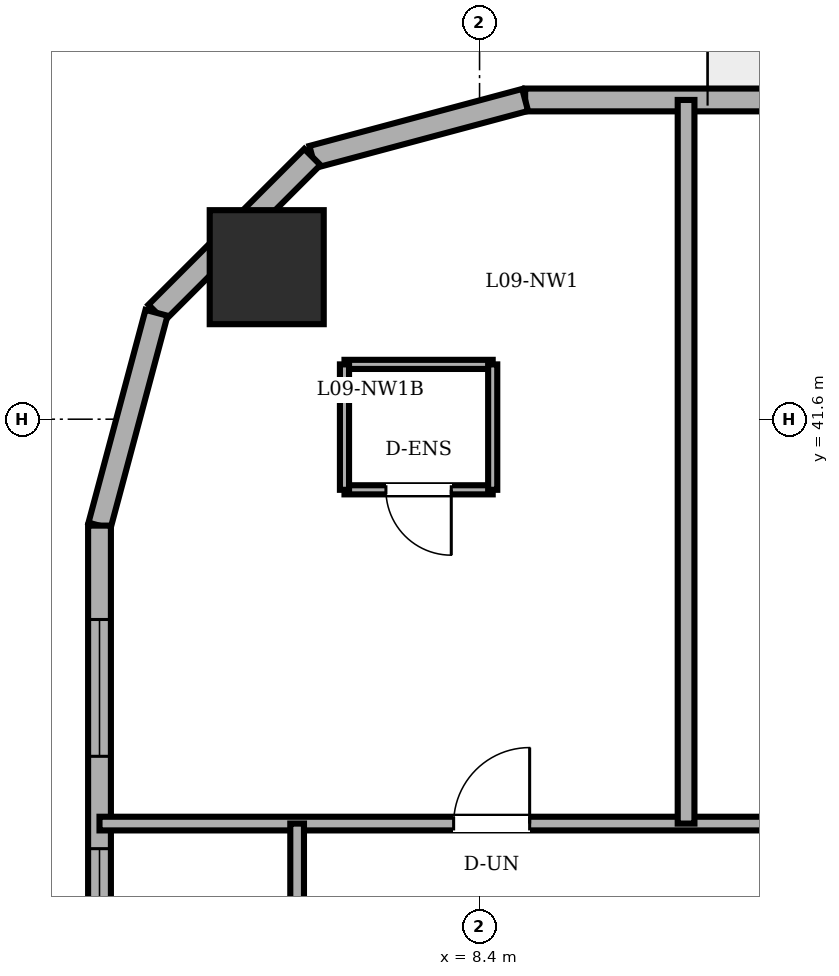
"""IFC4 building model, lengths in metres.
Left out: names, types, materials, properties, quantities, classifications, styles, units other than length and angle.
Written with IfcOpenShell. Run it as: python <this file> out.ifc"""

import sys

from ifc_helpers import new_model, si_unit, direction, frame, frame_2d, origin, origin_2d, place, context, subcontext, project, spatial, rectangle, circle, extrude, element, fill, save


model = new_model("IFC4")
c1 = context("Model", 3, precision=1e-05, world=origin(), true_north=direction((0.0, 1.0)))
c2 = subcontext(c1, "Body", "Model", "MODEL_VIEW")
j1 = project(units=[si_unit("LENGTHUNIT", "METRE"), si_unit("PLANEANGLEUNIT", "RADIAN")], contexts=[c1])
p1 = place(None, origin())
s1 = spatial("IfcSite", under=j1, at=p1, CompositionType="ELEMENT")
p2 = place(p1, origin())
s2 = spatial("IfcBuilding", under=s1, at=p2, CompositionType="ELEMENT")
p3 = place(p2, frame((0.0, 0.0, 36.0)))
s3 = spatial("IfcBuildingStorey", under=s2, at=p3, CompositionType="ELEMENT", Elevation=36.0)
p4 = place(p3, frame((5.6, 43.6, 0.0), z_axis=(0.0, 0.0, 1.0), x_axis=(1.0, 0.0, 0.0)))
e1 = element("IfcColumn", 1, at=p4, inside=s3, PredefinedType="COLUMN", context=c2, shape_type="SweptSolid", body=[
    extrude(circle(Radius=0.75, at=origin_2d()), origin(), (0.0, 0.0, 1.0), 3.6),
])
p5 = place(p3, frame((39.079, 45.8, 0.0), z_axis=(0.0, 0.0, 1.0), x_axis=(-1.0, 0.0, 0.0)))
e2 = element("IfcWall", 2, at=p5, inside=s3, PredefinedType="SOLIDWALL", context=c2, shape_type="SweptSolid", body=[
    extrude(rectangle(XDim=30.079, YDim=0.3, at=frame_2d((15.04, 0.0))), origin(), (0.0, 0.0, 1.0), 3.4),
])
p6 = place(p5, frame((16.504, 0.0, 0.0)))
e3 = element("IfcOpeningElement", 3, at=p6, cuts=e2, PredefinedType="OPENING", context=c2, shape_type="SweptSolid", body=[
    extrude(rectangle(XDim=0.95, YDim=2.2, at=frame_2d((0.475, 1.1))), frame((0.0, 0.16, 0.0), z_axis=(0.0, -1.0, 0.0), x_axis=(1.0, 0.0, 0.0)), (0.0, 0.0, 1.0), 0.32),
])
p7 = place(p5, frame((2.226, 0.0, 0.85)))
e4 = element("IfcOpeningElement", 4, at=p7, cuts=e2, PredefinedType="OPENING", context=c2, shape_type="SweptSolid", body=[
    extrude(rectangle(XDim=1.8, YDim=1.55, at=frame_2d((0.9, 0.775))), frame((0.0, 0.16, 0.0), z_axis=(0.0, -1.0, 0.0), x_axis=(1.0, 0.0, 0.0)), (0.0, 0.0, 1.0), 0.32),
])
p8 = place(p5, frame((5.003, 0.0, 0.85)))
e5 = element("IfcOpeningElement", 5, at=p8, cuts=e2, PredefinedType="OPENING", context=c2, shape_type="SweptSolid", body=[
    extrude(rectangle(XDim=1.8, YDim=1.55, at=frame_2d((0.9, 0.775))), frame((0.0, 0.16, 0.0), z_axis=(0.0, -1.0, 0.0), x_axis=(1.0, 0.0, 0.0)), (0.0, 0.0, 1.0), 0.32),
])
p9 = place(p5, frame((10.179, 0.0, 0.85)))
e6 = element("IfcOpeningElement", 6, at=p9, cuts=e2, PredefinedType="OPENING", context=c2, shape_type="SweptSolid", body=[
    extrude(rectangle(XDim=1.8, YDim=1.55, at=frame_2d((0.9, 0.775))), frame((0.0, 0.16, 0.0), z_axis=(0.0, -1.0, 0.0), x_axis=(1.0, 0.0, 0.0)), (0.0, 0.0, 1.0), 0.32),
])
p10 = place(p5, frame((12.579, 0.0, 0.85)))
e7 = element("IfcOpeningElement", 7, at=p10, cuts=e2, PredefinedType="OPENING", context=c2, shape_type="SweptSolid", body=[
    extrude(rectangle(XDim=1.8, YDim=1.55, at=frame_2d((0.9, 0.775))), frame((0.0, 0.16, 0.0), z_axis=(0.0, -1.0, 0.0), x_axis=(1.0, 0.0, 0.0)), (0.0, 0.0, 1.0), 0.32),
])
p11 = place(p5, frame((19.007, 0.0, 0.85)))
e8 = element("IfcOpeningElement", 8, at=p11, cuts=e2, PredefinedType="OPENING", context=c2, shape_type="SweptSolid", body=[
    extrude(rectangle(XDim=1.8, YDim=1.55, at=frame_2d((0.9, 0.775))), frame((0.0, 0.16, 0.0), z_axis=(0.0, -1.0, 0.0), x_axis=(1.0, 0.0, 0.0)), (0.0, 0.0, 1.0), 0.32),
])
p12 = place(p5, frame((23.034, 0.0, 0.85)))
e9 = element("IfcOpeningElement", 9, at=p12, cuts=e2, PredefinedType="OPENING", context=c2, shape_type="SweptSolid", body=[
    extrude(rectangle(XDim=1.8, YDim=1.55, at=frame_2d((0.9, 0.775))), frame((0.0, 0.16, 0.0), z_axis=(0.0, -1.0, 0.0), x_axis=(1.0, 0.0, 0.0)), (0.0, 0.0, 1.0), 0.32),
])
p13 = place(p3, frame((9.0, 45.8, 0.0), z_axis=(0.0, 0.0, 1.0), x_axis=(-0.96594917914, -0.258731875344, 0.0)))
e10 = element("IfcWall", 10, at=p13, inside=s3, PredefinedType="SOLIDWALL", context=c2, shape_type="SweptSolid", body=[
    extrude(rectangle(XDim=2.899, YDim=0.3, at=frame_2d((1.449, 0.0))), origin(), (0.0, 0.0, 1.0), 3.4),
])
p14 = place(p3, frame((6.2, 45.05, 0.0), z_axis=(0.0, 0.0, 1.0), x_axis=(-0.707106781187, -0.707106781187, 0.0)))
e11 = element("IfcWall", 11, at=p14, inside=s3, PredefinedType="SOLIDWALL", context=c2, shape_type="SweptSolid", body=[
    extrude(rectangle(XDim=2.899, YDim=0.3, at=frame_2d((1.45, 0.0))), origin(), (0.0, 0.0, 1.0), 3.4),
])
p15 = place(p3, frame((4.15, 43.0, 0.0), z_axis=(0.0, 0.0, 1.0), x_axis=(-0.258731875344, -0.96594917914, 0.0)))
e12 = element("IfcWall", 12, at=p15, inside=s3, PredefinedType="SOLIDWALL", context=c2, shape_type="SweptSolid", body=[
    extrude(rectangle(XDim=2.899, YDim=0.3, at=frame_2d((1.449, 0.0))), origin(), (0.0, 0.0, 1.0), 3.4),
])
p16 = place(p3, frame((3.4, 40.2, 0.0), z_axis=(0.0, 0.0, 1.0), x_axis=(0.0, -1.0, 0.0)))
e13 = element("IfcWall", 13, at=p16, inside=s3, PredefinedType="SOLIDWALL", context=c2, shape_type="SweptSolid", body=[
    extrude(rectangle(XDim=32.4, YDim=0.3, at=frame_2d((16.2, 0.0))), origin(), (0.0, 0.0, 1.0), 3.4),
])
p17 = place(p16, frame((1.235, 0.0, 0.85)))
e14 = element("IfcOpeningElement", 14, at=p17, cuts=e13, PredefinedType="OPENING", context=c2, shape_type="SweptSolid", body=[
    extrude(rectangle(XDim=1.8, YDim=1.55, at=frame_2d((0.9, 0.775))), frame((0.0, 0.16, 0.0), z_axis=(0.0, -1.0, 0.0), x_axis=(1.0, 0.0, 0.0)), (0.0, 0.0, 1.0), 0.32),
])
p18 = place(p16, frame((4.25, 0.0, 0.85)))
e15 = element("IfcOpeningElement", 15, at=p18, cuts=e13, PredefinedType="OPENING", context=c2, shape_type="SweptSolid", body=[
    extrude(rectangle(XDim=1.8, YDim=1.55, at=frame_2d((0.9, 0.775))), frame((0.0, 0.16, 0.0), z_axis=(0.0, -1.0, 0.0), x_axis=(1.0, 0.0, 0.0)), (0.0, 0.0, 1.0), 0.32),
])
p19 = place(p16, frame((9.253, 0.0, 0.85)))
e16 = element("IfcOpeningElement", 16, at=p19, cuts=e13, PredefinedType="OPENING", context=c2, shape_type="SweptSolid", body=[
    extrude(rectangle(XDim=1.8, YDim=1.55, at=frame_2d((0.9, 0.775))), frame((0.0, 0.16, 0.0), z_axis=(0.0, -1.0, 0.0), x_axis=(1.0, 0.0, 0.0)), (0.0, 0.0, 1.0), 0.32),
])
p20 = place(p16, frame((13.027, 0.0, 0.85)))
e17 = element("IfcOpeningElement", 17, at=p20, cuts=e13, PredefinedType="OPENING", context=c2, shape_type="SweptSolid", body=[
    extrude(rectangle(XDim=1.8, YDim=1.55, at=frame_2d((0.9, 0.775))), frame((0.0, 0.16, 0.0), z_axis=(0.0, -1.0, 0.0), x_axis=(1.0, 0.0, 0.0)), (0.0, 0.0, 1.0), 0.32),
])
p21 = place(p16, frame((19.573, 0.0, 0.85)))
e18 = element("IfcOpeningElement", 18, at=p21, cuts=e13, PredefinedType="OPENING", context=c2, shape_type="SweptSolid", body=[
    extrude(rectangle(XDim=1.8, YDim=1.55, at=frame_2d((0.9, 0.775))), frame((0.0, 0.16, 0.0), z_axis=(0.0, -1.0, 0.0), x_axis=(1.0, 0.0, 0.0)), (0.0, 0.0, 1.0), 0.32),
])
p22 = place(p16, frame((22.347, 0.0, 0.85)))
e19 = element("IfcOpeningElement", 19, at=p22, cuts=e13, PredefinedType="OPENING", context=c2, shape_type="SweptSolid", body=[
    extrude(rectangle(XDim=1.8, YDim=1.55, at=frame_2d((0.9, 0.775))), frame((0.0, 0.16, 0.0), z_axis=(0.0, -1.0, 0.0), x_axis=(1.0, 0.0, 0.0)), (0.0, 0.0, 1.0), 0.32),
])
p23 = place(p16, frame((26.35, 0.0, 0.85)))
e20 = element("IfcOpeningElement", 20, at=p23, cuts=e13, PredefinedType="OPENING", context=c2, shape_type="SweptSolid", body=[
    extrude(rectangle(XDim=1.8, YDim=1.55, at=frame_2d((0.9, 0.775))), frame((0.0, 0.16, 0.0), z_axis=(0.0, -1.0, 0.0), x_axis=(1.0, 0.0, 0.0)), (0.0, 0.0, 1.0), 0.32),
])
p24 = place(p16, frame((29.365, 0.0, 0.85)))
e21 = element("IfcOpeningElement", 21, at=p24, cuts=e13, PredefinedType="OPENING", context=c2, shape_type="SweptSolid", body=[
    extrude(rectangle(XDim=1.8, YDim=1.55, at=frame_2d((0.9, 0.775))), frame((0.0, 0.16, 0.0), z_axis=(0.0, -1.0, 0.0), x_axis=(1.0, 0.0, 0.0)), (0.0, 0.0, 1.0), 0.32),
])
p25 = place(p3, frame((6.623, 42.321, 0.0), z_axis=(0.0, 0.0, 1.0), x_axis=(1.0, 0.0, 0.0)))
e22 = element("IfcWall", 22, at=p25, inside=s3, PredefinedType="PARTITIONING", context=c2, shape_type="SweptSolid", body=[
    extrude(rectangle(XDim=1.95, YDim=0.12, at=frame_2d((0.975, 0.0))), origin(), (0.0, 0.0, 1.0), 3.4),
])
p26 = place(p3, frame((8.573, 40.671, 0.0), z_axis=(0.0, 0.0, 1.0), x_axis=(-1.0, 0.0, 0.0)))
e23 = element("IfcWall", 23, at=p26, inside=s3, PredefinedType="PARTITIONING", context=c2, shape_type="SweptSolid", body=[
    extrude(rectangle(XDim=1.95, YDim=0.12, at=frame_2d((0.975, 0.0))), origin(), (0.0, 0.0, 1.0), 3.4),
])
p27 = place(p26, frame((0.545, 0.0, 0.0)))
e24 = element("IfcOpeningElement", 24, at=p27, cuts=e23, PredefinedType="OPENING", context=c2, shape_type="SweptSolid", body=[
    extrude(rectangle(XDim=0.86, YDim=2.1, at=frame_2d((0.43, 1.05))), frame((0.0, 0.07, 0.0), z_axis=(0.0, -1.0, 0.0), x_axis=(1.0, 0.0, 0.0)), (0.0, 0.0, 1.0), 0.14),
])
for number, where, z_axis, x_axis in (
    (25, (6.623, 42.321, 0.0), (0.0, 0.0, 1.0), (0.0, -1.0, 0.0)),
    (26, (8.573, 40.671, 0.0), (0.0, 0.0, 1.0), (0.0, 1.0, 0.0)),
):
    element("IfcWall", number, at=place(p3, frame(where, z_axis=z_axis, x_axis=x_axis)), inside=s3, PredefinedType="PARTITIONING", context=c2, shape_type="SweptSolid", body=[
        extrude(rectangle(XDim=1.65, YDim=0.12, at=frame_2d((0.825, 0.0))), origin(), (0.0, 0.0, 1.0), 3.4),
    ])
p28 = place(p3, frame((3.4, 36.28, 0.0), z_axis=(0.0, 0.0, 1.0), x_axis=(1.0, 0.0, 0.0)))
e27 = element("IfcWall", 27, at=p28, inside=s3, PredefinedType="PARTITIONING", context=c2, shape_type="SweptSolid", body=[
    extrude(rectangle(XDim=36.45, YDim=0.18, at=frame_2d((18.225, 0.0))), origin(), (0.0, 0.0, 1.0), 3.4),
])
p29 = place(p28, frame((21.05, 0.0, 0.0)))
e28 = element("IfcOpeningElement", 28, at=p29, cuts=e27, PredefinedType="OPENING", context=c2, shape_type="SweptSolid", body=[
    extrude(rectangle(XDim=0.9, YDim=2.1, at=frame_2d((0.45, 1.05))), frame((0.0, 0.1, 0.0), z_axis=(0.0, -1.0, 0.0), x_axis=(1.0, 0.0, 0.0)), (0.0, 0.0, 1.0), 0.2),
])
p30 = place(p28, frame((24.67, 0.0, 0.0)))
e29 = element("IfcOpeningElement", 29, at=p30, cuts=e27, PredefinedType="OPENING", context=c2, shape_type="SweptSolid", body=[
    extrude(rectangle(XDim=0.86, YDim=2.1, at=frame_2d((0.43, 1.05))), frame((0.0, 0.1, 0.0), z_axis=(0.0, -1.0, 0.0), x_axis=(1.0, 0.0, 0.0)), (0.0, 0.0, 1.0), 0.2),
])
p31 = place(p28, frame((4.659, 0.0, 0.0)))
e30 = element("IfcOpeningElement", 30, at=p31, cuts=e27, PredefinedType="OPENING", context=c2, shape_type="SweptSolid", body=[
    extrude(rectangle(XDim=1.0, YDim=2.15, at=frame_2d((0.5, 1.075))), frame((0.0, 0.1, 0.0), z_axis=(0.0, -1.0, 0.0), x_axis=(1.0, 0.0, 0.0)), (0.0, 0.0, 1.0), 0.2),
])
p32 = place(p28, frame((13.258, 0.0, 0.0)))
e31 = element("IfcOpeningElement", 31, at=p32, cuts=e27, PredefinedType="OPENING", context=c2, shape_type="SweptSolid", body=[
    extrude(rectangle(XDim=1.0, YDim=2.15, at=frame_2d((0.5, 1.075))), frame((0.0, 0.1, 0.0), z_axis=(0.0, -1.0, 0.0), x_axis=(1.0, 0.0, 0.0)), (0.0, 0.0, 1.0), 0.2),
])
p33 = place(p28, frame((30.965, 0.0, 0.0)))
e32 = element("IfcOpeningElement", 32, at=p33, cuts=e27, PredefinedType="OPENING", context=c2, shape_type="SweptSolid", body=[
    extrude(rectangle(XDim=1.0, YDim=2.15, at=frame_2d((0.5, 1.075))), frame((0.0, 0.1, 0.0), z_axis=(0.0, -1.0, 0.0), x_axis=(1.0, 0.0, 0.0)), (0.0, 0.0, 1.0), 0.2),
])
p34 = place(p3, frame((6.0, 33.82, 0.0), z_axis=(0.0, 0.0, 1.0), x_axis=(0.0, 1.0, 0.0)))
e33 = element("IfcWall", 33, at=p34, inside=s3, PredefinedType="PARTITIONING", context=c2, shape_type="SweptSolid", body=[
    extrude(rectangle(XDim=2.46, YDim=0.18, at=frame_2d((1.23, 0.0))), origin(), (0.0, 0.0, 1.0), 3.4),
])
p35 = place(p3, frame((11.117, 36.28, 0.0), z_axis=(0.0, 0.0, 1.0), x_axis=(0.0, 1.0, 0.0)))
e34 = element("IfcWall", 34, at=p35, inside=s3, PredefinedType="PARTITIONING", context=c2, shape_type="SweptSolid", body=[
    extrude(rectangle(XDim=9.52, YDim=0.22, at=frame_2d((4.76, 0.0))), origin(), (0.0, 0.0, 1.0), 3.4),
])
p36 = place(p17, origin())
e35 = element("IfcWindow", 35, at=p36, inside=s3, PartitioningType="DOUBLE_PANEL_VERTICAL", PredefinedType="WINDOW", context=c2, shape_type="SweptSolid", body=[
    extrude(rectangle(XDim=1.8, YDim=1.55, at=frame_2d((0.9, 0.775))), frame((0.0, 0.03, 0.0), z_axis=(0.0, -1.0, 0.0), x_axis=(1.0, 0.0, 0.0)), (0.0, 0.0, 1.0), 0.06),
])
fill(e14, e35)
p37 = place(p18, origin())
e36 = element("IfcWindow", 36, at=p37, inside=s3, PartitioningType="DOUBLE_PANEL_VERTICAL", PredefinedType="WINDOW", context=c2, shape_type="SweptSolid", body=[
    extrude(rectangle(XDim=1.8, YDim=1.55, at=frame_2d((0.9, 0.775))), frame((0.0, 0.03, 0.0), z_axis=(0.0, -1.0, 0.0), x_axis=(1.0, 0.0, 0.0)), (0.0, 0.0, 1.0), 0.06),
])
fill(e15, e36)
p38 = place(p27, origin())
e37 = element("IfcDoor", 37, at=p38, inside=s3, OperationType="SINGLE_SWING_LEFT", PredefinedType="DOOR", context=c2, shape_type="SweptSolid", body=[
    extrude(rectangle(XDim=0.86, YDim=2.1, at=frame_2d((0.43, 1.05))), frame((0.0, 0.025, 0.0), z_axis=(0.0, -1.0, 0.0), x_axis=(1.0, 0.0, 0.0)), (0.0, 0.0, 1.0), 0.05),
])
fill(e24, e37)
p39 = place(p31, origin())
e38 = element("IfcDoor", 38, at=p39, inside=s3, OperationType="SINGLE_SWING_RIGHT", PredefinedType="DOOR", context=c2, shape_type="SweptSolid", body=[
    extrude(rectangle(XDim=1.0, YDim=2.15, at=frame_2d((0.5, 1.075))), frame((0.0, 0.025, 0.0), z_axis=(0.0, -1.0, 0.0), x_axis=(1.0, 0.0, 0.0)), (0.0, 0.0, 1.0), 0.05),
])
fill(e30, e38)
save(model, sys.argv[1])
